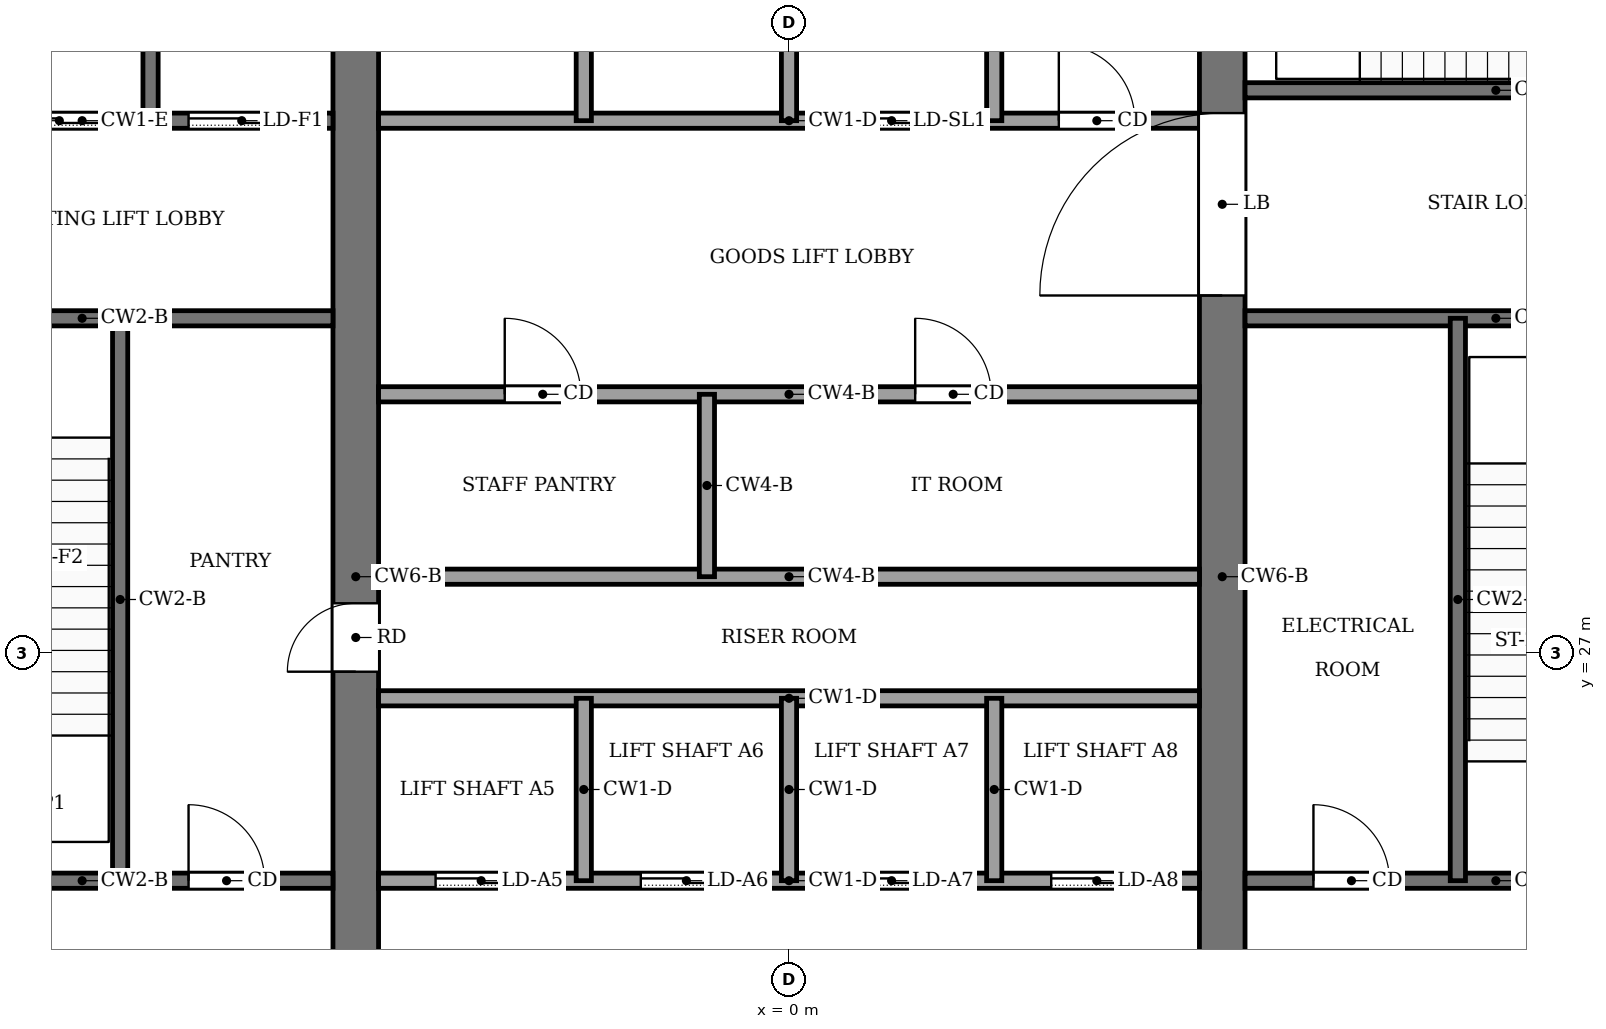
"""IFC4 building model, lengths in metres.
Left out: names, types, materials, properties, quantities, classifications, styles, units other than length and angle.
Written with IfcOpenShell. Run it as: python <this file> out.ifc"""

import sys

from ifc_helpers import new_model, si_unit, direction, frame, frame_2d, origin, place, context, subcontext, project, spatial, rectangle, extrude, element, fill, save


model = new_model("IFC4")
c1 = context("Model", 3, precision=1e-05, world=origin(), true_north=direction((0.0, 1.0)))
c2 = subcontext(c1, "Body", "Model", "MODEL_VIEW")
j1 = project(units=[si_unit("LENGTHUNIT", "METRE"), si_unit("PLANEANGLEUNIT", "RADIAN")], contexts=[c1])
p1 = place(None, origin())
s1 = spatial("IfcSite", under=j1, at=p1, CompositionType="ELEMENT")
p2 = place(p1, origin())
s2 = spatial("IfcBuilding", under=s1, at=p2, CompositionType="ELEMENT")
p3 = place(p2, frame((0.0, 0.0, 233.0)))
s3 = spatial("IfcBuildingStorey", under=s2, at=p3, CompositionType="ELEMENT", Elevation=233.0)
p4 = place(p3, frame((-5.7, 18.4, -0.13), z_axis=(0.0, 0.0, 1.0), x_axis=(0.0, 1.0, 0.0)))
e1 = element("IfcWall", 1, at=p4, inside=s3, PredefinedType="SHEAR", context=c2, shape_type="SweptSolid", body=[
    extrude(rectangle(XDim=19.2, YDim=0.6, at=frame_2d((9.6, 0.0))), origin(), (0.0, 0.0, 1.0), 5.0),
])
p5 = place(p4, frame((8.35, 0.0, 0.13)))
e2 = element("IfcOpeningElement", 2, at=p5, cuts=e1, PredefinedType="OPENING", context=c2, shape_type="SweptSolid", body=[
    extrude(rectangle(XDim=0.9, YDim=2.1, at=frame_2d((0.45, 1.05))), frame((0.0, 0.31, 0.0), z_axis=(0.0, -1.0, 0.0), x_axis=(1.0, 0.0, 0.0)), (0.0, 0.0, 1.0), 0.62),
])
p6 = place(p3, frame((5.7, 18.4, -0.13), z_axis=(0.0, 0.0, 1.0), x_axis=(0.0, 1.0, 0.0)))
e3 = element("IfcWall", 3, at=p6, inside=s3, PredefinedType="SHEAR", context=c2, shape_type="SweptSolid", body=[
    extrude(rectangle(XDim=19.2, YDim=0.6, at=frame_2d((9.6, 0.0))), origin(), (0.0, 0.0, 1.0), 5.0),
])
p7 = place(p6, frame((13.3, 0.0, 0.13)))
e4 = element("IfcOpeningElement", 4, at=p7, cuts=e3, PredefinedType="OPENING", context=c2, shape_type="SweptSolid", body=[
    extrude(rectangle(XDim=2.4, YDim=2.4, at=frame_2d((1.2, 1.2))), frame((0.0, 0.31, 0.0), z_axis=(0.0, -1.0, 0.0), x_axis=(1.0, 0.0, 0.0)), (0.0, 0.0, 1.0), 0.62),
])
p8 = place(p3, frame((-12.6, 24.0, 0.0), z_axis=(0.0, 0.0, 1.0), x_axis=(1.0, 0.0, 0.0)))
e5 = element("IfcWall", 5, at=p8, inside=s3, PredefinedType="PARTITIONING", context=c2, shape_type="SweptSolid", body=[
    extrude(rectangle(XDim=6.6, YDim=0.2, at=frame_2d((3.3, 0.0))), origin(), (0.0, 0.0, 1.0), 4.87),
])
p9 = place(p8, frame((4.7, 0.0, 0.0)))
e6 = element("IfcOpeningElement", 6, at=p9, cuts=e5, PredefinedType="OPENING", context=c2, shape_type="SweptSolid", body=[
    extrude(rectangle(XDim=1.0, YDim=2.1, at=frame_2d((0.5, 1.05))), frame((0.0, 0.11, 0.0), z_axis=(0.0, -1.0, 0.0), x_axis=(1.0, 0.0, 0.0)), (0.0, 0.0, 1.0), 0.22),
])
p10 = place(p3, frame((-5.4, 24.0, 0.0), z_axis=(0.0, 0.0, 1.0), x_axis=(1.0, 0.0, 0.0)))
e7 = element("IfcWall", 7, at=p10, inside=s3, PredefinedType="PARTITIONING", context=c2, shape_type="SweptSolid", body=[
    extrude(rectangle(XDim=10.8, YDim=0.2, at=frame_2d((5.4, 0.0))), origin(), (0.0, 0.0, 1.0), 4.87),
])
p11 = place(p10, frame((0.75, 0.0, 0.0)))
e8 = element("IfcOpeningElement", 8, at=p11, cuts=e7, PredefinedType="OPENING", context=c2, shape_type="SweptSolid", body=[
    extrude(rectangle(XDim=1.2, YDim=2.2, at=frame_2d((0.6, 1.1))), frame((0.0, 0.11, 0.0), z_axis=(0.0, -1.0, 0.0), x_axis=(1.0, 0.0, 0.0)), (0.0, 0.0, 1.0), 0.22),
])
p12 = place(p10, frame((3.45, 0.0, 0.0)))
e9 = element("IfcOpeningElement", 9, at=p12, cuts=e7, PredefinedType="OPENING", context=c2, shape_type="SweptSolid", body=[
    extrude(rectangle(XDim=1.2, YDim=2.2, at=frame_2d((0.6, 1.1))), frame((0.0, 0.11, 0.0), z_axis=(0.0, -1.0, 0.0), x_axis=(1.0, 0.0, 0.0)), (0.0, 0.0, 1.0), 0.22),
])
p13 = place(p10, frame((6.15, 0.0, 0.0)))
e10 = element("IfcOpeningElement", 10, at=p13, cuts=e7, PredefinedType="OPENING", context=c2, shape_type="SweptSolid", body=[
    extrude(rectangle(XDim=1.2, YDim=2.2, at=frame_2d((0.6, 1.1))), frame((0.0, 0.11, 0.0), z_axis=(0.0, -1.0, 0.0), x_axis=(1.0, 0.0, 0.0)), (0.0, 0.0, 1.0), 0.22),
])
p14 = place(p10, frame((8.85, 0.0, 0.0)))
e11 = element("IfcOpeningElement", 11, at=p14, cuts=e7, PredefinedType="OPENING", context=c2, shape_type="SweptSolid", body=[
    extrude(rectangle(XDim=1.2, YDim=2.2, at=frame_2d((0.6, 1.1))), frame((0.0, 0.11, 0.0), z_axis=(0.0, -1.0, 0.0), x_axis=(1.0, 0.0, 0.0)), (0.0, 0.0, 1.0), 0.22),
])
p15 = place(p3, frame((6.0, 24.0, 0.0), z_axis=(0.0, 0.0, 1.0), x_axis=(1.0, 0.0, 0.0)))
e12 = element("IfcWall", 12, at=p15, inside=s3, PredefinedType="PARTITIONING", context=c2, shape_type="SweptSolid", body=[
    extrude(rectangle(XDim=6.6, YDim=0.2, at=frame_2d((3.3, 0.0))), origin(), (0.0, 0.0, 1.0), 4.87),
])
p16 = place(p15, frame((0.9, 0.0, 0.0)))
e13 = element("IfcOpeningElement", 13, at=p16, cuts=e12, PredefinedType="OPENING", context=c2, shape_type="SweptSolid", body=[
    extrude(rectangle(XDim=1.0, YDim=2.1, at=frame_2d((0.5, 1.05))), frame((0.0, 0.11, 0.0), z_axis=(0.0, -1.0, 0.0), x_axis=(1.0, 0.0, 0.0)), (0.0, 0.0, 1.0), 0.22),
])
p17 = place(p15, frame((4.4, 0.0, 0.0)))
e14 = element("IfcOpeningElement", 14, at=p17, cuts=e12, PredefinedType="OPENING", context=c2, shape_type="SweptSolid", body=[
    extrude(rectangle(XDim=1.2, YDim=2.2, at=frame_2d((0.6, 1.1))), frame((0.0, 0.11, 0.0), z_axis=(0.0, -1.0, 0.0), x_axis=(1.0, 0.0, 0.0)), (0.0, 0.0, 1.0), 0.22),
])
for number, where, z_axis, x_axis in (
    (15, (-5.4, 26.4, 0.0), (0.0, 0.0, 1.0), (1.0, 0.0, 0.0)),
    (16, (-5.4, 28.0, 0.0), (0.0, 0.0, 1.0), (1.0, 0.0, 0.0)),
):
    element("IfcWall", number, at=place(p3, frame(where, z_axis=z_axis, x_axis=x_axis)), inside=s3, PredefinedType="PARTITIONING", context=c2, shape_type="SweptSolid", body=[
        extrude(rectangle(XDim=10.8, YDim=0.2, at=frame_2d((5.4, 0.0))), origin(), (0.0, 0.0, 1.0), 4.87),
    ])
p18 = place(p3, frame((-5.4, 30.4, 0.0), z_axis=(0.0, 0.0, 1.0), x_axis=(1.0, 0.0, 0.0)))
e17 = element("IfcWall", 17, at=p18, inside=s3, PredefinedType="PARTITIONING", context=c2, shape_type="SweptSolid", body=[
    extrude(rectangle(XDim=10.8, YDim=0.2, at=frame_2d((5.4, 0.0))), origin(), (0.0, 0.0, 1.0), 4.87),
])
p19 = place(p18, frame((1.66, 0.0, 0.0)))
e18 = element("IfcOpeningElement", 18, at=p19, cuts=e17, PredefinedType="OPENING", context=c2, shape_type="SweptSolid", body=[
    extrude(rectangle(XDim=1.0, YDim=2.1, at=frame_2d((0.5, 1.05))), frame((0.0, 0.11, 0.0), z_axis=(0.0, -1.0, 0.0), x_axis=(1.0, 0.0, 0.0)), (0.0, 0.0, 1.0), 0.22),
])
p20 = place(p18, frame((7.06, 0.0, 0.0)))
e19 = element("IfcOpeningElement", 19, at=p20, cuts=e17, PredefinedType="OPENING", context=c2, shape_type="SweptSolid", body=[
    extrude(rectangle(XDim=1.0, YDim=2.1, at=frame_2d((0.5, 1.05))), frame((0.0, 0.11, 0.0), z_axis=(0.0, -1.0, 0.0), x_axis=(1.0, 0.0, 0.0)), (0.0, 0.0, 1.0), 0.22),
])
p21 = place(p3, frame((-12.6, 31.4, 0.0), z_axis=(0.0, 0.0, 1.0), x_axis=(1.0, 0.0, 0.0)))
e20 = element("IfcWall", 20, at=p21, inside=s3, PredefinedType="PARTITIONING", context=c2, shape_type="SweptSolid", body=[
    extrude(rectangle(XDim=6.6, YDim=0.2, at=frame_2d((3.3, 0.0))), origin(), (0.0, 0.0, 1.0), 4.87),
])
p22 = place(p21, frame((1.0, 0.0, 0.0)))
e21 = element("IfcOpeningElement", 21, at=p22, cuts=e20, PredefinedType="OPENING", context=c2, shape_type="SweptSolid", body=[
    extrude(rectangle(XDim=1.2, YDim=2.2, at=frame_2d((0.6, 1.1))), frame((0.0, 0.11, 0.0), z_axis=(0.0, -1.0, 0.0), x_axis=(1.0, 0.0, 0.0)), (0.0, 0.0, 1.0), 0.22),
])
p23 = place(p3, frame((6.0, 31.4, 0.0), z_axis=(0.0, 0.0, 1.0), x_axis=(1.0, 0.0, 0.0)))
e22 = element("IfcWall", 22, at=p23, inside=s3, PredefinedType="PARTITIONING", context=c2, shape_type="SweptSolid", body=[
    extrude(rectangle(XDim=6.6, YDim=0.2, at=frame_2d((3.3, 0.0))), origin(), (0.0, 0.0, 1.0), 4.87),
])
p24 = place(p3, frame((-12.6, 34.0, 0.0), z_axis=(0.0, 0.0, 1.0), x_axis=(1.0, 0.0, 0.0)))
e23 = element("IfcWall", 23, at=p24, inside=s3, PredefinedType="PARTITIONING", context=c2, shape_type="SweptSolid", body=[
    extrude(rectangle(XDim=6.6, YDim=0.2, at=frame_2d((3.3, 0.0))), origin(), (0.0, 0.0, 1.0), 4.87),
])
p25 = place(p24, frame((4.7, 0.0, 0.0)))
e24 = element("IfcOpeningElement", 24, at=p25, cuts=e23, PredefinedType="OPENING", context=c2, shape_type="SweptSolid", body=[
    extrude(rectangle(XDim=1.4, YDim=2.2, at=frame_2d((0.7, 1.1))), frame((0.0, 0.11, 0.0), z_axis=(0.0, -1.0, 0.0), x_axis=(1.0, 0.0, 0.0)), (0.0, 0.0, 1.0), 0.22),
])
p26 = place(p24, frame((2.3, 0.0, 0.0)))
e25 = element("IfcOpeningElement", 25, at=p26, cuts=e23, PredefinedType="OPENING", context=c2, shape_type="SweptSolid", body=[
    extrude(rectangle(XDim=1.4, YDim=2.2, at=frame_2d((0.7, 1.1))), frame((0.0, 0.11, 0.0), z_axis=(0.0, -1.0, 0.0), x_axis=(1.0, 0.0, 0.0)), (0.0, 0.0, 1.0), 0.22),
])
p27 = place(p24, frame((0.45, 0.0, 0.0)))
e26 = element("IfcOpeningElement", 26, at=p27, cuts=e23, PredefinedType="OPENING", context=c2, shape_type="SweptSolid", body=[
    extrude(rectangle(XDim=0.9, YDim=2.1, at=frame_2d((0.45, 1.05))), frame((0.0, 0.11, 0.0), z_axis=(0.0, -1.0, 0.0), x_axis=(1.0, 0.0, 0.0)), (0.0, 0.0, 1.0), 0.22),
])
p28 = place(p3, frame((-5.4, 34.0, 0.0), z_axis=(0.0, 0.0, 1.0), x_axis=(1.0, 0.0, 0.0)))
e27 = element("IfcWall", 27, at=p28, inside=s3, PredefinedType="PARTITIONING", context=c2, shape_type="SweptSolid", body=[
    extrude(rectangle(XDim=10.8, YDim=0.2, at=frame_2d((5.4, 0.0))), origin(), (0.0, 0.0, 1.0), 4.87),
])
p29 = place(p28, frame((6.15, 0.0, 0.0)))
e28 = element("IfcOpeningElement", 28, at=p29, cuts=e27, PredefinedType="OPENING", context=c2, shape_type="SweptSolid", body=[
    extrude(rectangle(XDim=1.2, YDim=2.2, at=frame_2d((0.6, 1.1))), frame((0.0, 0.11, 0.0), z_axis=(0.0, -1.0, 0.0), x_axis=(1.0, 0.0, 0.0)), (0.0, 0.0, 1.0), 0.22),
])
p30 = place(p28, frame((8.95, 0.0, 0.0)))
e29 = element("IfcOpeningElement", 29, at=p30, cuts=e27, PredefinedType="OPENING", context=c2, shape_type="SweptSolid", body=[
    extrude(rectangle(XDim=1.0, YDim=2.1, at=frame_2d((0.5, 1.05))), frame((0.0, 0.11, 0.0), z_axis=(0.0, -1.0, 0.0), x_axis=(1.0, 0.0, 0.0)), (0.0, 0.0, 1.0), 0.22),
])
p31 = place(p3, frame((6.0, 34.4, 0.0), z_axis=(0.0, 0.0, 1.0), x_axis=(1.0, 0.0, 0.0)))
e30 = element("IfcWall", 30, at=p31, inside=s3, PredefinedType="PARTITIONING", context=c2, shape_type="SweptSolid", body=[
    extrude(rectangle(XDim=6.6, YDim=0.2, at=frame_2d((3.3, 0.0))), origin(), (0.0, 0.0, 1.0), 4.87),
])
p32 = place(p31, frame((4.8, 0.0, 0.0)))
e31 = element("IfcOpeningElement", 31, at=p32, cuts=e30, PredefinedType="OPENING", context=c2, shape_type="SweptSolid", body=[
    extrude(rectangle(XDim=1.2, YDim=2.2, at=frame_2d((0.6, 1.1))), frame((0.0, 0.11, 0.0), z_axis=(0.0, -1.0, 0.0), x_axis=(1.0, 0.0, 0.0)), (0.0, 0.0, 1.0), 0.22),
])
p33 = place(p3, frame((-8.8, 24.0, 0.0), z_axis=(0.0, 0.0, 1.0), x_axis=(0.0, 1.0, 0.0)))
e32 = element("IfcWall", 32, at=p33, inside=s3, PredefinedType="PARTITIONING", context=c2, shape_type="SweptSolid", body=[
    extrude(rectangle(XDim=7.4, YDim=0.2, at=frame_2d((3.7, 0.0))), origin(), (0.0, 0.0, 1.0), 4.87),
])
p34 = place(p3, frame((-8.4, 34.0, 0.0), z_axis=(0.0, 0.0, 1.0), x_axis=(0.0, 1.0, 0.0)))
e33 = element("IfcWall", 33, at=p34, inside=s3, PredefinedType="PARTITIONING", context=c2, shape_type="SweptSolid", body=[
    extrude(rectangle(XDim=3.6, YDim=0.2, at=frame_2d((1.8, 0.0))), origin(), (0.0, 0.0, 1.0), 4.87),
])
p35 = place(p3, frame((-2.7, 24.0, 0.0), z_axis=(0.0, 0.0, 1.0), x_axis=(0.0, 1.0, 0.0)))
e34 = element("IfcWall", 34, at=p35, inside=s3, PredefinedType="PARTITIONING", context=c2, shape_type="SweptSolid", body=[
    extrude(rectangle(XDim=2.4, YDim=0.2, at=frame_2d((1.2, 0.0))), origin(), (0.0, 0.0, 1.0), 4.87),
])
p36 = place(p3, frame((-2.7, 34.0, 0.0), z_axis=(0.0, 0.0, 1.0), x_axis=(0.0, 1.0, 0.0)))
e35 = element("IfcWall", 35, at=p36, inside=s3, PredefinedType="PARTITIONING", context=c2, shape_type="SweptSolid", body=[
    extrude(rectangle(XDim=3.6, YDim=0.2, at=frame_2d((1.8, 0.0))), origin(), (0.0, 0.0, 1.0), 4.87),
])
for number, where, z_axis, x_axis in (
    (36, (-1.08, 28.0, 0.0), (0.0, 0.0, 1.0), (0.0, 1.0, 0.0)),
    (37, (0.0, 24.0, 0.0), (0.0, 0.0, 1.0), (0.0, 1.0, 0.0)),
):
    element("IfcWall", number, at=place(p3, frame(where, z_axis=z_axis, x_axis=x_axis)), inside=s3, PredefinedType="PARTITIONING", context=c2, shape_type="SweptSolid", body=[
        extrude(rectangle(XDim=2.4, YDim=0.2, at=frame_2d((1.2, 0.0))), origin(), (0.0, 0.0, 1.0), 4.87),
    ])
p37 = place(p3, frame((0.0, 34.0, 0.0), z_axis=(0.0, 0.0, 1.0), x_axis=(0.0, 1.0, 0.0)))
e38 = element("IfcWall", 38, at=p37, inside=s3, PredefinedType="PARTITIONING", context=c2, shape_type="SweptSolid", body=[
    extrude(rectangle(XDim=3.6, YDim=0.2, at=frame_2d((1.8, 0.0))), origin(), (0.0, 0.0, 1.0), 4.87),
])
p38 = place(p3, frame((2.7, 24.0, 0.0), z_axis=(0.0, 0.0, 1.0), x_axis=(0.0, 1.0, 0.0)))
e39 = element("IfcWall", 39, at=p38, inside=s3, PredefinedType="PARTITIONING", context=c2, shape_type="SweptSolid", body=[
    extrude(rectangle(XDim=2.4, YDim=0.2, at=frame_2d((1.2, 0.0))), origin(), (0.0, 0.0, 1.0), 4.87),
])
p39 = place(p3, frame((2.7, 34.0, 0.0), z_axis=(0.0, 0.0, 1.0), x_axis=(0.0, 1.0, 0.0)))
e40 = element("IfcWall", 40, at=p39, inside=s3, PredefinedType="PARTITIONING", context=c2, shape_type="SweptSolid", body=[
    extrude(rectangle(XDim=3.6, YDim=0.2, at=frame_2d((1.8, 0.0))), origin(), (0.0, 0.0, 1.0), 4.87),
])
p40 = place(p3, frame((8.8, 24.0, 0.0), z_axis=(0.0, 0.0, 1.0), x_axis=(0.0, 1.0, 0.0)))
e41 = element("IfcWall", 41, at=p40, inside=s3, PredefinedType="PARTITIONING", context=c2, shape_type="SweptSolid", body=[
    extrude(rectangle(XDim=7.4, YDim=0.2, at=frame_2d((3.7, 0.0))), origin(), (0.0, 0.0, 1.0), 4.87),
])
p41 = place(p11, origin())
e42 = element("IfcDoor", 42, at=p41, inside=s3, OperationType="SLIDING_TO_LEFT", PredefinedType="DOOR", context=c2, shape_type="SweptSolid", body=[
    extrude(rectangle(XDim=1.2, YDim=2.2, at=frame_2d((0.6, 1.1))), frame((0.0, 0.025, 0.0), z_axis=(0.0, -1.0, 0.0), x_axis=(1.0, 0.0, 0.0)), (0.0, 0.0, 1.0), 0.05),
])
fill(e8, e42)
p42 = place(p12, origin())
e43 = element("IfcDoor", 43, at=p42, inside=s3, OperationType="SLIDING_TO_LEFT", PredefinedType="DOOR", context=c2, shape_type="SweptSolid", body=[
    extrude(rectangle(XDim=1.2, YDim=2.2, at=frame_2d((0.6, 1.1))), frame((0.0, 0.025, 0.0), z_axis=(0.0, -1.0, 0.0), x_axis=(1.0, 0.0, 0.0)), (0.0, 0.0, 1.0), 0.05),
])
fill(e9, e43)
p43 = place(p13, origin())
e44 = element("IfcDoor", 44, at=p43, inside=s3, OperationType="SLIDING_TO_LEFT", PredefinedType="DOOR", context=c2, shape_type="SweptSolid", body=[
    extrude(rectangle(XDim=1.2, YDim=2.2, at=frame_2d((0.6, 1.1))), frame((0.0, 0.025, 0.0), z_axis=(0.0, -1.0, 0.0), x_axis=(1.0, 0.0, 0.0)), (0.0, 0.0, 1.0), 0.05),
])
fill(e10, e44)
p44 = place(p14, origin())
e45 = element("IfcDoor", 45, at=p44, inside=s3, OperationType="SLIDING_TO_LEFT", PredefinedType="DOOR", context=c2, shape_type="SweptSolid", body=[
    extrude(rectangle(XDim=1.2, YDim=2.2, at=frame_2d((0.6, 1.1))), frame((0.0, 0.025, 0.0), z_axis=(0.0, -1.0, 0.0), x_axis=(1.0, 0.0, 0.0)), (0.0, 0.0, 1.0), 0.05),
])
fill(e11, e45)
p45 = place(p29, origin())
e46 = element("IfcDoor", 46, at=p45, inside=s3, OperationType="SLIDING_TO_LEFT", PredefinedType="DOOR", context=c2, shape_type="SweptSolid", body=[
    extrude(rectangle(XDim=1.2, YDim=2.2, at=frame_2d((0.6, 1.1))), frame((0.0, 0.025, 0.0), z_axis=(0.0, -1.0, 0.0), x_axis=(1.0, 0.0, 0.0)), (0.0, 0.0, 1.0), 0.05),
])
fill(e28, e46)
p46 = place(p25, origin())
e47 = element("IfcDoor", 47, at=p46, inside=s3, OperationType="SLIDING_TO_LEFT", PredefinedType="DOOR", context=c2, shape_type="SweptSolid", body=[
    extrude(rectangle(XDim=1.4, YDim=2.2, at=frame_2d((0.7, 1.1))), frame((0.0, 0.025, 0.0), z_axis=(0.0, -1.0, 0.0), x_axis=(1.0, 0.0, 0.0)), (0.0, 0.0, 1.0), 0.05),
])
fill(e24, e47)
p47 = place(p26, origin())
e48 = element("IfcDoor", 48, at=p47, inside=s3, OperationType="SLIDING_TO_LEFT", PredefinedType="DOOR", context=c2, shape_type="SweptSolid", body=[
    extrude(rectangle(XDim=1.4, YDim=2.2, at=frame_2d((0.7, 1.1))), frame((0.0, 0.025, 0.0), z_axis=(0.0, -1.0, 0.0), x_axis=(1.0, 0.0, 0.0)), (0.0, 0.0, 1.0), 0.05),
])
fill(e25, e48)
p48 = place(p19, origin())
e49 = element("IfcDoor", 49, at=p48, inside=s3, OperationType="SINGLE_SWING_RIGHT", PredefinedType="DOOR", context=c2, shape_type="SweptSolid", body=[
    extrude(rectangle(XDim=1.0, YDim=2.1, at=frame_2d((0.5, 1.05))), frame((0.0, 0.025, 0.0), z_axis=(0.0, -1.0, 0.0), x_axis=(1.0, 0.0, 0.0)), (0.0, 0.0, 1.0), 0.05),
])
fill(e18, e49)
p49 = place(p20, origin())
e50 = element("IfcDoor", 50, at=p49, inside=s3, OperationType="SINGLE_SWING_LEFT", PredefinedType="DOOR", context=c2, shape_type="SweptSolid", body=[
    extrude(rectangle(XDim=1.0, YDim=2.1, at=frame_2d((0.5, 1.05))), frame((0.0, 0.025, 0.0), z_axis=(0.0, -1.0, 0.0), x_axis=(1.0, 0.0, 0.0)), (0.0, 0.0, 1.0), 0.05),
])
fill(e19, e50)
p50 = place(p9, origin())
e51 = element("IfcDoor", 51, at=p50, inside=s3, OperationType="SINGLE_SWING_RIGHT", PredefinedType="DOOR", context=c2, shape_type="SweptSolid", body=[
    extrude(rectangle(XDim=1.0, YDim=2.1, at=frame_2d((0.5, 1.05))), frame((0.0, 0.025, 0.0), z_axis=(0.0, -1.0, 0.0), x_axis=(1.0, 0.0, 0.0)), (0.0, 0.0, 1.0), 0.05),
])
fill(e6, e51)
p51 = place(p16, origin())
e52 = element("IfcDoor", 52, at=p51, inside=s3, OperationType="SINGLE_SWING_LEFT", PredefinedType="DOOR", context=c2, shape_type="SweptSolid", body=[
    extrude(rectangle(XDim=1.0, YDim=2.1, at=frame_2d((0.5, 1.05))), frame((0.0, 0.025, 0.0), z_axis=(0.0, -1.0, 0.0), x_axis=(1.0, 0.0, 0.0)), (0.0, 0.0, 1.0), 0.05),
])
fill(e13, e52)
p52 = place(p30, origin())
e53 = element("IfcDoor", 53, at=p52, inside=s3, OperationType="SINGLE_SWING_LEFT", PredefinedType="DOOR", context=c2, shape_type="SweptSolid", body=[
    extrude(rectangle(XDim=1.0, YDim=2.1, at=frame_2d((0.5, 1.05))), frame((0.0, 0.025, 0.0), z_axis=(0.0, -1.0, 0.0), x_axis=(1.0, 0.0, 0.0)), (0.0, 0.0, 1.0), 0.05),
])
fill(e29, e53)
p53 = place(p5, origin())
e54 = element("IfcDoor", 54, at=p53, inside=s3, OperationType="SINGLE_SWING_RIGHT", PredefinedType="DOOR", context=c2, shape_type="SweptSolid", body=[
    extrude(rectangle(XDim=0.9, YDim=2.1, at=frame_2d((0.45, 1.05))), frame((0.0, 0.025, 0.0), z_axis=(0.0, -1.0, 0.0), x_axis=(1.0, 0.0, 0.0)), (0.0, 0.0, 1.0), 0.05),
])
fill(e2, e54)
p54 = place(p7, origin())
e55 = element("IfcDoor", 55, at=p54, inside=s3, OperationType="DOUBLE_DOOR_SINGLE_SWING", PredefinedType="DOOR", context=c2, shape_type="SweptSolid", body=[
    extrude(rectangle(XDim=2.4, YDim=2.4, at=frame_2d((1.2, 1.2))), frame((0.0, 0.025, 0.0), z_axis=(0.0, -1.0, 0.0), x_axis=(1.0, 0.0, 0.0)), (0.0, 0.0, 1.0), 0.05),
])
fill(e4, e55)
save(model, sys.argv[1])
